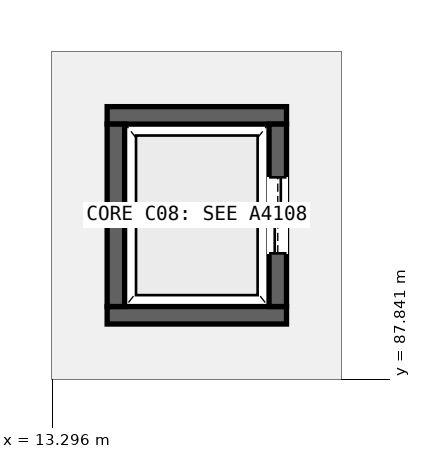
"""IFC4 building model, lengths in metres.
Left out: names, types, materials, properties, quantities, classifications, styles, units other than length and angle.
Written with IfcOpenShell. Run it as: python <this file> out.ifc"""

import sys

from ifc_helpers import new_model, si_unit, direction, frame, frame_2d, origin, origin_2d, place, context, subcontext, project, spatial, rectangle, extrude, element, fill, save


model = new_model("IFC4")
c1 = context("Model", 3, precision=1e-05, world=origin(), true_north=direction((0.0, 1.0)))
c2 = subcontext(c1, "Body", "Model", "MODEL_VIEW")
j1 = project(units=[si_unit("LENGTHUNIT", "METRE"), si_unit("PLANEANGLEUNIT", "RADIAN")], contexts=[c1])
p1 = place(None, origin())
s1 = spatial("IfcSite", under=j1, at=p1, CompositionType="ELEMENT")
p2 = place(p1, origin())
s2 = spatial("IfcBuilding", under=s1, at=p2, CompositionType="ELEMENT")
p3 = place(p2, frame((0.0, 0.0, 25.8)))
s3 = spatial("IfcBuildingStorey", under=s2, at=p3, CompositionType="ELEMENT", Elevation=25.8)
for number, where, z_axis, x_axis in (
    (1, (14.02, 88.685, 0.0), (0.0, 0.0, 1.0), (1.0, 0.0, 0.0)),
    (2, (14.02, 91.315, 0.0), (0.0, 0.0, 1.0), (1.0, 0.0, 0.0)),
):
    element("IfcWall", number, at=place(p3, frame(where, z_axis=z_axis, x_axis=x_axis)), inside=s3, PredefinedType="SHEAR", context=c2, shape_type="SweptSolid", body=[
        extrude(rectangle(XDim=2.36, YDim=0.23, at=frame_2d((1.18, 0.0))), origin(), (0.0, 0.0, 1.0), 5.04),
    ])
p4 = place(p3, frame((14.135, 88.8, 0.0), z_axis=(0.0, 0.0, 1.0), x_axis=(0.0, 1.0, 0.0)))
e3 = element("IfcWall", 3, at=p4, inside=s3, PredefinedType="SHEAR", context=c2, shape_type="SweptSolid", body=[
    extrude(rectangle(XDim=2.4, YDim=0.23, at=frame_2d((1.2, 0.0))), origin(), (0.0, 0.0, 1.0), 5.04),
])
p5 = place(p3, frame((16.265, 88.8, 0.0), z_axis=(0.0, 0.0, 1.0), x_axis=(0.0, 1.0, 0.0)))
e4 = element("IfcWall", 4, at=p5, inside=s3, PredefinedType="SHEAR", context=c2, shape_type="SweptSolid", body=[
    extrude(rectangle(XDim=2.4, YDim=0.23, at=frame_2d((1.2, 0.0))), origin(), (0.0, 0.0, 1.0), 5.04),
])
p6 = place(p5, frame((0.7, 0.0, 0.0)))
e5 = element("IfcOpeningElement", 5, at=p6, cuts=e4, PredefinedType="OPENING", context=c2, shape_type="SweptSolid", body=[
    extrude(rectangle(XDim=1.0, YDim=2.15, at=frame_2d((0.5, 1.075))), frame((0.0, 0.125, 0.0), z_axis=(0.0, -1.0, 0.0), x_axis=(1.0, 0.0, 0.0)), (0.0, 0.0, 1.0), 0.25),
])
p7 = place(p2, frame((0.0, 0.0, 31.2)))
p8 = place(p7, frame((0.0, 0.0, -0.36)))
p9 = place(p8, frame((18.0, 90.0, 0.0)))
p10 = place(p9, frame((0.0, 0.0, 0.31)))
e6 = element("IfcWindow", 6, at=p10, inside=s3, PartitioningType="SINGLE_PANEL", PredefinedType="SKYLIGHT", context=c2, shape_type="SweptSolid", body=[
    extrude(rectangle(XDim=3.6, YDim=1.5, at=origin_2d()), origin(), (0.0, 0.0, 1.0), 0.05),
])
p11 = place(p6, origin())
e7 = element("IfcDoor", 7, at=p11, inside=s3, OperationType="DOUBLE_DOOR_SLIDING", PredefinedType="DOOR", context=c2, shape_type="SweptSolid", body=[
    extrude(rectangle(XDim=1.0, YDim=2.15, at=frame_2d((0.5, 1.075))), frame((0.0, 0.025, 0.0), z_axis=(0.0, -1.0, 0.0), x_axis=(1.0, 0.0, 0.0)), (0.0, 0.0, 1.0), 0.05),
])
fill(e5, e7)
save(model, sys.argv[1])
